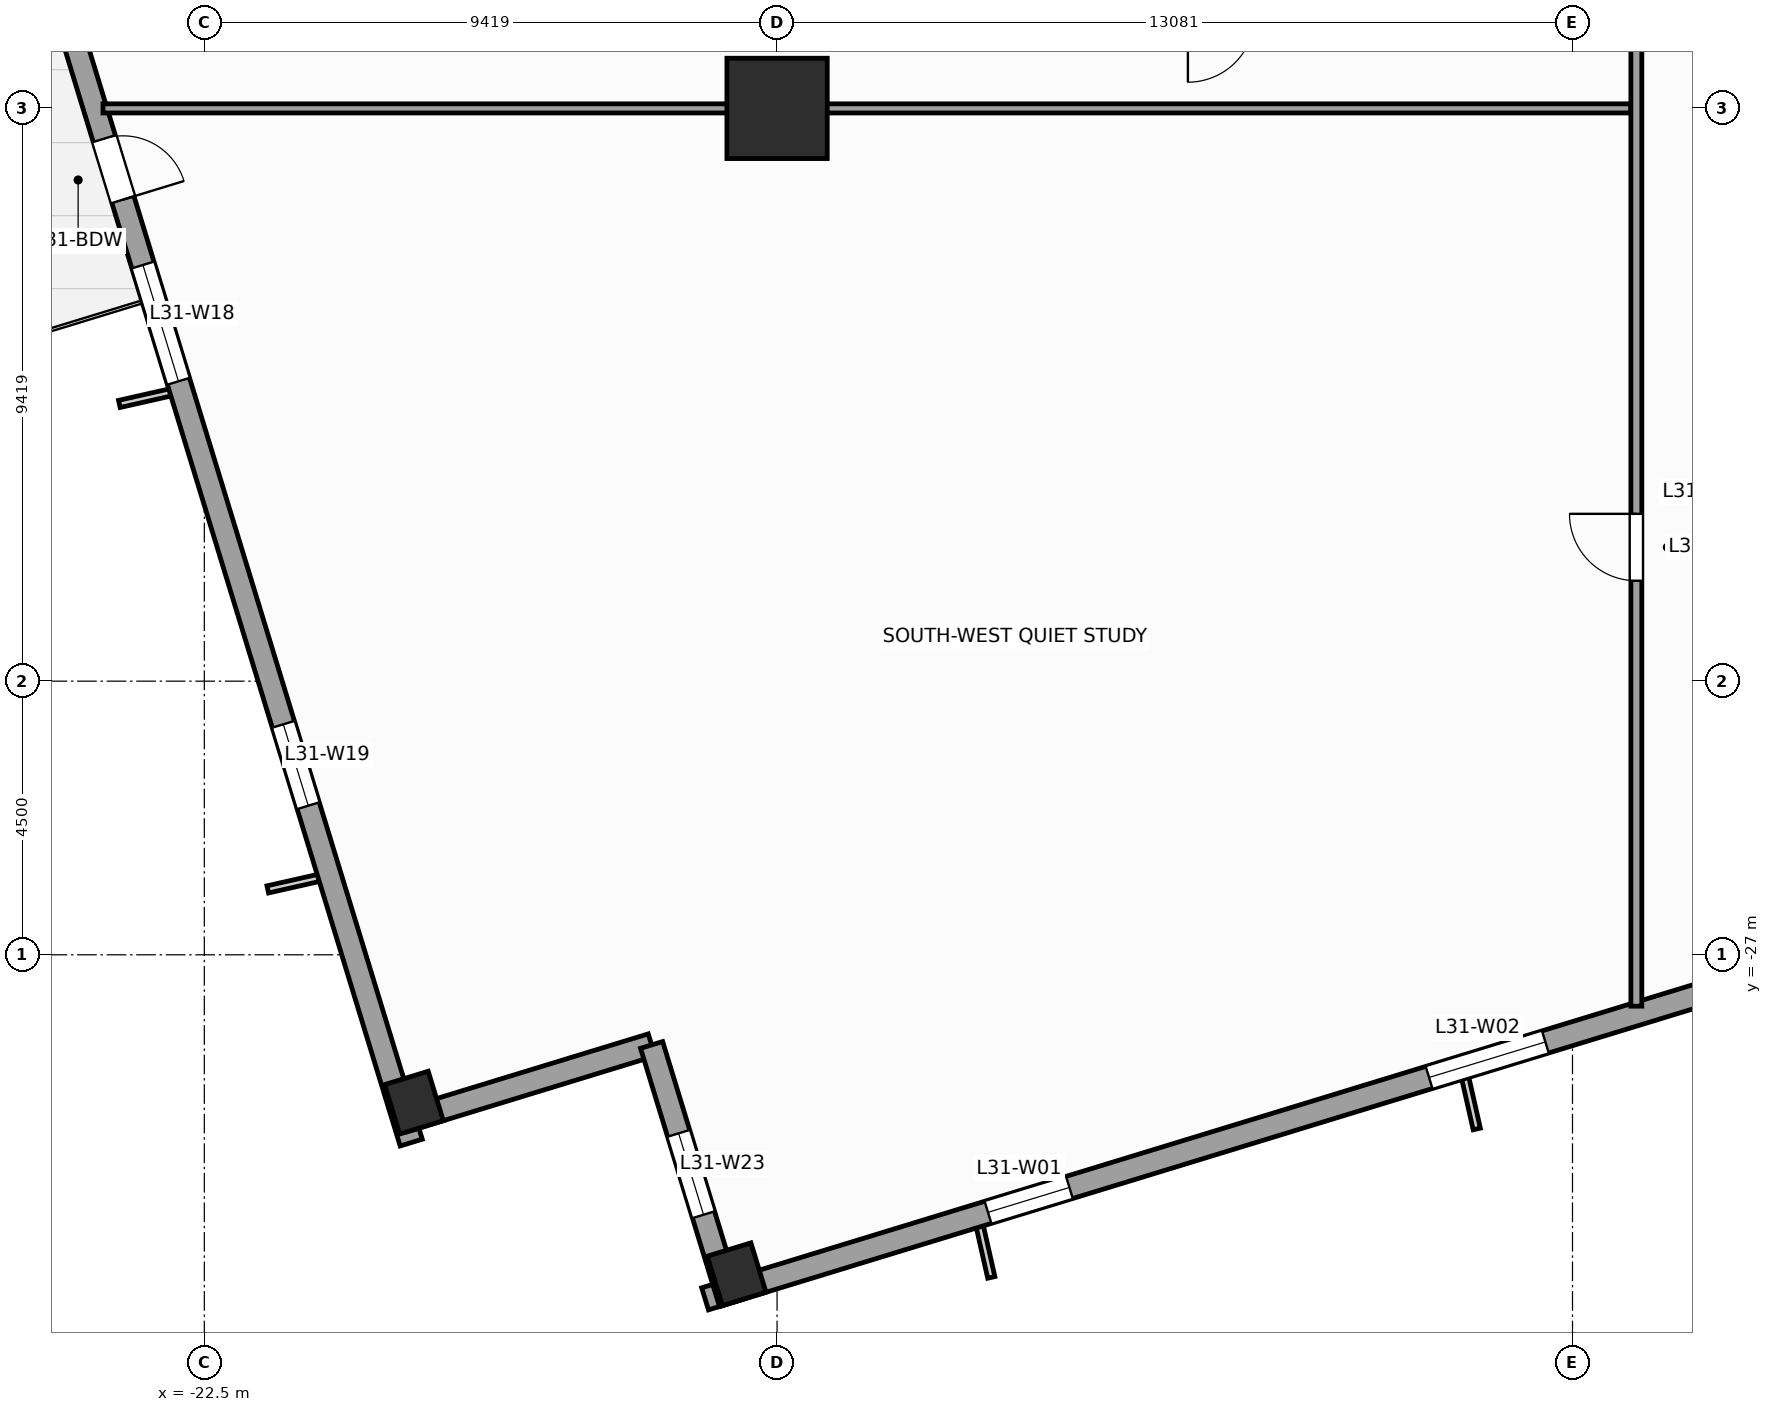
"""IFC4 building model, lengths in metres.
Left out: names, types, materials, properties, quantities, classifications, styles, units other than length and angle.
Written with IfcOpenShell. Run it as: python <this file> out.ifc"""

import sys

from ifc_helpers import new_model, si_unit, direction, frame, frame_2d, origin, origin_2d, place, context, subcontext, project, spatial, rectangle, extrude, source, transform, mapped, element, fill, save


model = new_model("IFC4")
c1 = context("Model", 3, precision=1e-05, world=origin(), true_north=direction((0.0, 1.0)))
c2 = subcontext(c1, "Body", "Model", "MODEL_VIEW")
j1 = project(units=[si_unit("LENGTHUNIT", "METRE"), si_unit("PLANEANGLEUNIT", "RADIAN")], contexts=[c1])
p1 = place(None, origin())
s1 = spatial("IfcSite", under=j1, at=p1, CompositionType="ELEMENT")
p2 = place(p1, origin())
s2 = spatial("IfcBuilding", under=s1, at=p2, CompositionType="ELEMENT")
p3 = place(p2, frame((0.0, 0.0, 131.2)))
s3 = spatial("IfcBuildingStorey", under=s2, at=p3, CompositionType="ELEMENT", Elevation=131.2)
m1 = source(origin(), c2, "Body", "SweptSolid", [
    extrude(rectangle(XDim=1.65, YDim=1.65, at=origin_2d()), origin(), (0.0, 0.0, 1.0), 4.0),
])
p4 = place(p3, frame((-13.081, -13.081, 0.0), z_axis=(0.0, 0.0, 1.0), x_axis=(1.0, 0.0, 0.0)))
e1 = element("IfcColumn", 1, at=p4, inside=s3, PredefinedType="COLUMN", context=c2, shape_type="MappedRepresentation", body=[
    mapped(m1, transform((0.0, 0.0, 0.0), scale=1.0)),
])
m2 = source(origin(), c2, "Body", "SweptSolid", [
    extrude(rectangle(XDim=0.75, YDim=0.85, at=origin_2d()), origin(), (0.0, 0.0, 1.0), 4.0),
])
for number, where, z_axis, x_axis in (
    (2, (-13.746, -32.253, 0.0), (0.0, 0.0, 1.0), (0.956, 0.292, 0.0)),
    (3, (-19.052, -29.431, 0.0), (0.0, 0.0, 1.0), (0.956, 0.292, 0.0)),
):
    element("IfcColumn", number, at=place(p3, frame(where, z_axis=z_axis, x_axis=x_axis)), inside=s3, PredefinedType="COLUMN", context=c2, shape_type="MappedRepresentation", body=[
        mapped(m2, transform((0.0, 0.0, 0.0), scale=1.0)),
    ])
p5 = place(p3, frame((-14.265, -32.658, 0.0), z_axis=(0.0, 0.0, 1.0), x_axis=(0.956304320851, 0.292373127906, 0.0)))
e4 = element("IfcWall", 4, at=p5, inside=s3, PredefinedType="STANDARD", context=c2, shape_type="SweptSolid", body=[
    extrude(rectangle(XDim=46.38, YDim=0.38, at=frame_2d((23.19, 0.0))), origin(), (0.0, 0.0, 1.0), 3.14),
])
p6 = place(p5, frame((4.865, 0.0, 0.51)))
e5 = element("IfcOpeningElement", 5, at=p6, cuts=e4, PredefinedType="OPENING", context=c2, shape_type="SweptSolid", body=[
    extrude(rectangle(XDim=1.4, YDim=2.4, at=frame_2d((0.7, 1.2))), frame((0.0, 0.2, 0.0), z_axis=(0.0, -1.0, 0.0), x_axis=(1.0, 0.0, 0.0)), (0.0, 0.0, 1.0), 0.4),
])
p7 = place(p5, frame((12.45, 0.0, 0.51)))
e6 = element("IfcOpeningElement", 6, at=p7, cuts=e4, PredefinedType="OPENING", context=c2, shape_type="SweptSolid", body=[
    extrude(rectangle(XDim=2.0, YDim=2.4, at=frame_2d((1.0, 1.2))), frame((0.0, 0.2, 0.0), z_axis=(0.0, -1.0, 0.0), x_axis=(1.0, 0.0, 0.0)), (0.0, 0.0, 1.0), 0.4),
])
p8 = place(p5, frame((19.762, 0.0, 0.51)))
e7 = element("IfcOpeningElement", 7, at=p8, cuts=e4, PredefinedType="OPENING", context=c2, shape_type="SweptSolid", body=[
    extrude(rectangle(XDim=2.0, YDim=2.4, at=frame_2d((1.0, 1.2))), frame((0.0, 0.2, 0.0), z_axis=(0.0, -1.0, 0.0), x_axis=(1.0, 0.0, 0.0)), (0.0, 0.0, 1.0), 0.4),
])
p9 = place(p5, frame((30.538, 0.0, 0.51)))
e8 = element("IfcOpeningElement", 8, at=p9, cuts=e4, PredefinedType="OPENING", context=c2, shape_type="SweptSolid", body=[
    extrude(rectangle(XDim=2.0, YDim=2.4, at=frame_2d((1.0, 1.2))), frame((0.0, 0.2, 0.0), z_axis=(0.0, -1.0, 0.0), x_axis=(1.0, 0.0, 0.0)), (0.0, 0.0, 1.0), 0.4),
])
p10 = place(p5, frame((39.187, 0.0, 0.51)))
e9 = element("IfcOpeningElement", 9, at=p10, cuts=e4, PredefinedType="OPENING", context=c2, shape_type="SweptSolid", body=[
    extrude(rectangle(XDim=1.4, YDim=2.4, at=frame_2d((0.7, 1.2))), frame((0.0, 0.2, 0.0), z_axis=(0.0, -1.0, 0.0), x_axis=(1.0, 0.0, 0.0)), (0.0, 0.0, 1.0), 0.4),
])
p11 = place(p3, frame((-32.658, 14.265, 0.0), z_axis=(0.0, 0.0, 1.0), x_axis=(0.292373127906, -0.956304320851, 0.0)))
e10 = element("IfcWall", 10, at=p11, inside=s3, PredefinedType="STANDARD", context=c2, shape_type="SweptSolid", body=[
    extrude(rectangle(XDim=46.38, YDim=0.38, at=frame_2d((23.19, 0.0))), origin(), (0.0, 0.0, 1.0), 3.14),
])
p12 = place(p11, frame((29.115, 0.0, 0.0)))
e11 = element("IfcOpeningElement", 11, at=p12, cuts=e10, PredefinedType="OPENING", context=c2, shape_type="SweptSolid", body=[
    extrude(rectangle(XDim=1.05, YDim=2.25, at=frame_2d((0.525, 1.125))), frame((0.0, 0.2, 0.0), z_axis=(0.0, -1.0, 0.0), x_axis=(1.0, 0.0, 0.0)), (0.0, 0.0, 1.0), 0.4),
])
p13 = place(p11, frame((4.865, 0.0, 0.51)))
e12 = element("IfcOpeningElement", 12, at=p13, cuts=e10, PredefinedType="OPENING", context=c2, shape_type="SweptSolid", body=[
    extrude(rectangle(XDim=1.4, YDim=2.4, at=frame_2d((0.7, 1.2))), frame((0.0, 0.2, 0.0), z_axis=(0.0, -1.0, 0.0), x_axis=(1.0, 0.0, 0.0)), (0.0, 0.0, 1.0), 0.4),
])
p14 = place(p11, frame((14.7, 0.0, 0.51)))
e13 = element("IfcOpeningElement", 13, at=p14, cuts=e10, PredefinedType="OPENING", context=c2, shape_type="SweptSolid", body=[
    extrude(rectangle(XDim=2.0, YDim=2.4, at=frame_2d((1.0, 1.2))), frame((0.0, 0.2, 0.0), z_axis=(0.0, -1.0, 0.0), x_axis=(1.0, 0.0, 0.0)), (0.0, 0.0, 1.0), 0.4),
])
p15 = place(p11, frame((31.288, 0.0, 0.51)))
e14 = element("IfcOpeningElement", 14, at=p15, cuts=e10, PredefinedType="OPENING", context=c2, shape_type="SweptSolid", body=[
    extrude(rectangle(XDim=2.0, YDim=2.4, at=frame_2d((1.0, 1.2))), frame((0.0, 0.2, 0.0), z_axis=(0.0, -1.0, 0.0), x_axis=(1.0, 0.0, 0.0)), (0.0, 0.0, 1.0), 0.4),
])
p16 = place(p11, frame((39.187, 0.0, 0.51)))
e15 = element("IfcOpeningElement", 15, at=p16, cuts=e10, PredefinedType="OPENING", context=c2, shape_type="SweptSolid", body=[
    extrude(rectangle(XDim=1.4, YDim=2.4, at=frame_2d((0.7, 1.2))), frame((0.0, 0.2, 0.0), z_axis=(0.0, -1.0, 0.0), x_axis=(1.0, 0.0, 0.0)), (0.0, 0.0, 1.0), 0.4),
])
p17 = place(p3, frame((-19.208, -29.725, 0.0), z_axis=(0.0, 0.0, 1.0), x_axis=(0.956312764915, 0.292345507338, 0.0)))
e16 = element("IfcWall", 16, at=p17, inside=s3, PredefinedType="STANDARD", context=c2, shape_type="SweptSolid", body=[
    extrude(rectangle(XDim=4.25, YDim=0.38, at=frame_2d((2.125, 0.0))), origin(), (0.0, 0.0, 1.0), 3.74),
])
p18 = place(p3, frame((-15.144, -28.482, 0.0), z_axis=(0.0, 0.0, 1.0), x_axis=(0.292373601522, -0.956304176051, 0.0)))
e17 = element("IfcWall", 17, at=p18, inside=s3, PredefinedType="STANDARD", context=c2, shape_type="SweptSolid", body=[
    extrude(rectangle(XDim=4.44, YDim=0.38, at=frame_2d((2.22, 0.0))), origin(), (0.0, 0.0, 1.0), 3.04),
])
p19 = place(p18, frame((1.52, 0.0, 0.51)))
e18 = element("IfcOpeningElement", 18, at=p19, cuts=e17, PredefinedType="OPENING", context=c2, shape_type="SweptSolid", body=[
    extrude(rectangle(XDim=1.4, YDim=2.4, at=frame_2d((0.7, 1.2))), frame((0.0, 0.2, 0.0), z_axis=(0.0, -1.0, 0.0), x_axis=(1.0, 0.0, 0.0)), (0.0, 0.0, 1.0), 0.4),
])
p20 = place(p3, frame((1.05, -27.845, 0.0), z_axis=(0.0, 0.0, 1.0), x_axis=(0.0, 1.0, 0.0)))
e19 = element("IfcWall", 19, at=p20, inside=s3, PredefinedType="PARTITIONING", context=c2, shape_type="SweptSolid", body=[
    extrude(rectangle(XDim=16.195, YDim=0.18, at=frame_2d((8.097, 0.0))), origin(), (0.0, 0.0, 1.0), 3.74),
])
p21 = place(p20, frame((6.996, 0.0, 0.0)))
e20 = element("IfcOpeningElement", 20, at=p21, cuts=e19, PredefinedType="OPENING", context=c2, shape_type="SweptSolid", body=[
    extrude(rectangle(XDim=1.1, YDim=2.2, at=frame_2d((0.55, 1.1))), frame((0.0, 0.1, 0.0), z_axis=(0.0, -1.0, 0.0), x_axis=(1.0, 0.0, 0.0)), (0.0, 0.0, 1.0), 0.2),
])
p22 = place(p3, frame((-24.167, -13.081, 0.0), z_axis=(0.0, 0.0, 1.0), x_axis=(1.0, 0.0, 0.0)))
e21 = element("IfcWall", 21, at=p22, inside=s3, PredefinedType="PARTITIONING", context=c2, shape_type="SweptSolid", body=[
    extrude(rectangle(XDim=25.122, YDim=0.15, at=frame_2d((12.561, 0.0))), origin(), (0.0, 0.0, 1.0), 2.732),
])
m3 = source(origin(), c2, "Body", "SweptSolid", [
    extrude(rectangle(XDim=1.4, YDim=2.4, at=frame_2d((0.7, 1.2))), frame((0.0, 0.03, 0.0), z_axis=(0.0, -1.0, 0.0), x_axis=(1.0, 0.0, 0.0)), (0.0, 0.0, 1.0), 0.06),
])
p23 = place(p6, origin())
e22 = element("IfcWindow", 22, at=p23, inside=s3, PartitioningType="SINGLE_PANEL", PredefinedType="WINDOW", context=c2, shape_type="MappedRepresentation", body=[
    mapped(m3, transform((0.0, 0.0, 0.0), scale=1.0)),
])
fill(e5, e22)
m4 = source(origin(), c2, "Body", "SweptSolid", [
    extrude(rectangle(XDim=2.0, YDim=2.4, at=frame_2d((1.0, 1.2))), frame((0.0, 0.03, 0.0), z_axis=(0.0, -1.0, 0.0), x_axis=(1.0, 0.0, 0.0)), (0.0, 0.0, 1.0), 0.06),
])
p24 = place(p7, origin())
e23 = element("IfcWindow", 23, at=p24, inside=s3, PartitioningType="SINGLE_PANEL", PredefinedType="WINDOW", context=c2, shape_type="MappedRepresentation", body=[
    mapped(m4, transform((0.0, 0.0, 0.0), scale=1.0)),
])
fill(e6, e23)
m5 = source(origin(), c2, "Body", "SweptSolid", [
    extrude(rectangle(XDim=1.05, YDim=2.25, at=frame_2d((0.525, 1.125))), frame((0.0, 0.025, 0.0), z_axis=(0.0, -1.0, 0.0), x_axis=(1.0, 0.0, 0.0)), (0.0, 0.0, 1.0), 0.05),
])
p25 = place(p12, origin())
e24 = element("IfcDoor", 24, at=p25, inside=s3, OperationType="SINGLE_SWING_RIGHT", PredefinedType="DOOR", context=c2, shape_type="MappedRepresentation", body=[
    mapped(m5, transform((0.0, 0.0, 0.0), scale=1.0)),
])
fill(e11, e24)
p26 = place(p15, origin())
e25 = element("IfcWindow", 25, at=p26, inside=s3, PartitioningType="SINGLE_PANEL", PredefinedType="WINDOW", context=c2, shape_type="MappedRepresentation", body=[
    mapped(m4, transform((0.0, 0.0, 0.0), scale=1.0)),
])
fill(e14, e25)
p27 = place(p16, origin())
e26 = element("IfcWindow", 26, at=p27, inside=s3, PartitioningType="SINGLE_PANEL", PredefinedType="WINDOW", context=c2, shape_type="MappedRepresentation", body=[
    mapped(m3, transform((0.0, 0.0, 0.0), scale=1.0)),
])
fill(e15, e26)
p28 = place(p19, origin())
e27 = element("IfcWindow", 27, at=p28, inside=s3, PartitioningType="SINGLE_PANEL", PredefinedType="WINDOW", context=c2, shape_type="MappedRepresentation", body=[
    mapped(m3, transform((0.0, 0.0, 0.0), scale=1.0)),
])
fill(e18, e27)
m6 = source(origin(), c2, "Body", "SweptSolid", [
    extrude(rectangle(XDim=1.1, YDim=2.2, at=frame_2d((0.55, 1.1))), frame((0.0, 0.025, 0.0), z_axis=(0.0, -1.0, 0.0), x_axis=(1.0, 0.0, 0.0)), (0.0, 0.0, 1.0), 0.05),
])
p29 = place(p21, origin())
e28 = element("IfcDoor", 28, at=p29, inside=s3, OperationType="SINGLE_SWING_RIGHT", PredefinedType="DOOR", context=c2, shape_type="MappedRepresentation", body=[
    mapped(m6, transform((0.0, 0.0, 0.0), scale=1.0)),
])
fill(e20, e28)
save(model, sys.argv[1])
